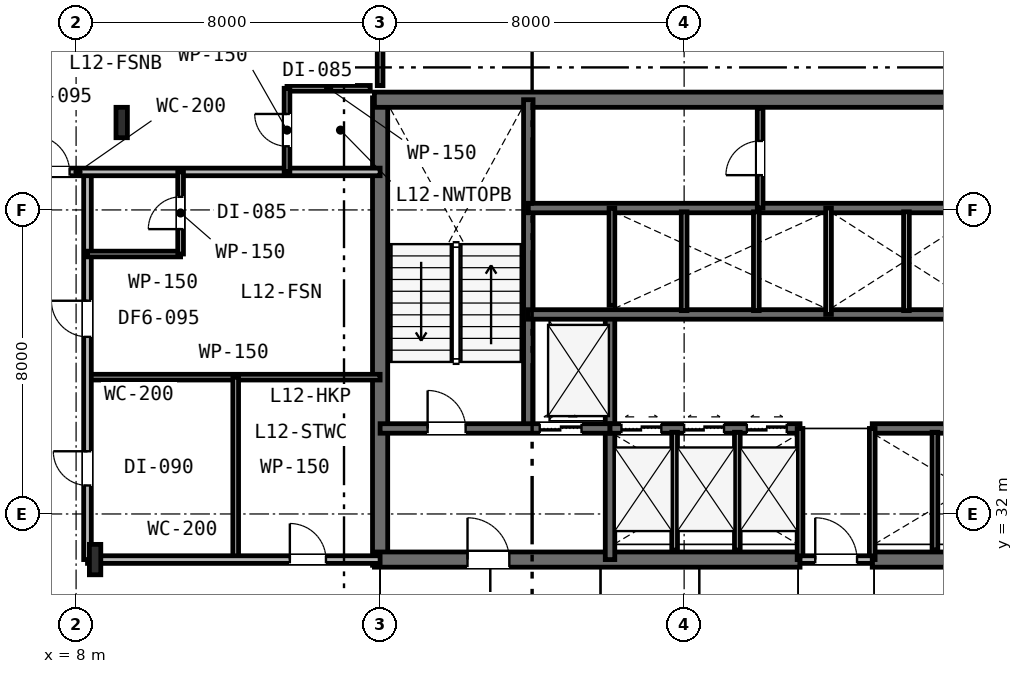
"""IFC4 building model, lengths in metres.
Left out: names, types, materials, properties, quantities, classifications, styles, units other than length and angle.
Written with IfcOpenShell. Run it as: python <this file> out.ifc"""

import sys

from ifc_helpers import new_model, si_unit, direction, frame, frame_2d, origin, origin_2d, place, context, subcontext, project, spatial, rectangle, i_section, extrude, element, fill, save


model = new_model("IFC4")
c1 = context("Model", 3, precision=1e-05, world=origin(), true_north=direction((0.0, 1.0)))
c2 = subcontext(c1, "Body", "Model", "MODEL_VIEW")
j1 = project(units=[si_unit("LENGTHUNIT", "METRE"), si_unit("PLANEANGLEUNIT", "RADIAN")], contexts=[c1])
p1 = place(None, origin())
s1 = spatial("IfcSite", under=j1, at=p1, CompositionType="ELEMENT")
p2 = place(p1, origin())
s2 = spatial("IfcBuilding", under=s1, at=p2, CompositionType="ELEMENT")
p3 = place(p2, frame((0.0, 0.0, 51.0)))
s3 = spatial("IfcBuildingStorey", under=s2, at=p3, CompositionType="ELEMENT", Elevation=51.0)
p4 = place(p3, frame((16.0, 30.65, 0.0), z_axis=(0.0, 0.0, 1.0), x_axis=(0.0, 1.0, 0.0)))
e1 = element("IfcWall", 1, at=p4, inside=s3, PredefinedType="SHEAR", context=c2, shape_type="SweptSolid", body=[
    extrude(rectangle(XDim=12.3, YDim=0.4, at=frame_2d((6.15, 0.0))), origin(), (0.0, 0.0, 1.0), 3.6),
])
p5 = place(p3, frame((15.85, 42.9, 0.0), z_axis=(0.0, 0.0, 1.0), x_axis=(1.0, 0.0, 0.0)))
e2 = element("IfcWall", 2, at=p5, inside=s3, PredefinedType="SHEAR", context=c2, shape_type="SweptSolid", body=[
    extrude(rectangle(XDim=24.3, YDim=0.4, at=frame_2d((12.15, 0.0))), origin(), (0.0, 0.0, 1.0), 3.6),
])
p6 = place(p3, frame((15.85, 30.8, 0.0), z_axis=(0.0, 0.0, 1.0), x_axis=(1.0, 0.0, 0.0)))
e3 = element("IfcWall", 3, at=p6, inside=s3, PredefinedType="SHEAR", context=c2, shape_type="SweptSolid", body=[
    extrude(rectangle(XDim=11.2, YDim=0.4, at=frame_2d((5.6, 0.0))), origin(), (0.0, 0.0, 1.0), 3.6),
])
p7 = place(p6, frame((2.45, 0.0, 0.0)))
e4 = element("IfcOpeningElement", 4, at=p7, cuts=e3, PredefinedType="OPENING", context=c2, shape_type="SweptSolid", body=[
    extrude(rectangle(XDim=1.1, YDim=2.15, at=frame_2d((0.55, 1.075))), frame((0.0, 0.21, 0.0), z_axis=(0.0, -1.0, 0.0), x_axis=(1.0, 0.0, 0.0)), (0.0, 0.0, 1.0), 0.42),
])
p8 = place(p3, frame((28.95, 30.8, 0.0), z_axis=(0.0, 0.0, 1.0), x_axis=(1.0, 0.0, 0.0)))
e5 = element("IfcWall", 5, at=p8, inside=s3, PredefinedType="SHEAR", context=c2, shape_type="SweptSolid", body=[
    extrude(rectangle(XDim=11.2, YDim=0.4, at=frame_2d((5.6, 0.0))), origin(), (0.0, 0.0, 1.0), 3.6),
])
p9 = place(p8, frame((7.65, 0.0, 0.0)))
e6 = element("IfcOpeningElement", 6, at=p9, cuts=e5, PredefinedType="OPENING", context=c2, shape_type="SweptSolid", body=[
    extrude(rectangle(XDim=1.1, YDim=2.15, at=frame_2d((0.55, 1.075))), frame((0.0, 0.21, 0.0), z_axis=(0.0, -1.0, 0.0), x_axis=(1.0, 0.0, 0.0)), (0.0, 0.0, 1.0), 0.42),
])
p10 = place(p3, frame((19.9, 34.25, 0.0), z_axis=(0.0, 0.0, 1.0), x_axis=(0.0, 1.0, 0.0)))
e7 = element("IfcWall", 7, at=p10, inside=s3, PredefinedType="SHEAR", context=c2, shape_type="SweptSolid", body=[
    extrude(rectangle(XDim=8.65, YDim=0.25, at=frame_2d((4.325, 0.0))), origin(), (0.0, 0.0, 1.0), 3.6),
])
p11 = place(p3, frame((22.05, 30.8, 0.0), z_axis=(0.0, 0.0, 1.0), x_axis=(0.0, 1.0, 0.0)))
e8 = element("IfcWall", 8, at=p11, inside=s3, PredefinedType="SHEAR", context=c2, shape_type="SweptSolid", body=[
    extrude(rectangle(XDim=6.45, YDim=0.25, at=frame_2d((3.225, 0.0))), origin(), (0.0, 0.0, 1.0), 3.6),
])
p12 = place(p3, frame((16.0, 34.25, 0.0), z_axis=(0.0, 0.0, 1.0), x_axis=(1.0, 0.0, 0.0)))
e9 = element("IfcWall", 9, at=p12, inside=s3, PredefinedType="SHEAR", context=c2, shape_type="SweptSolid", body=[
    extrude(rectangle(XDim=6.05, YDim=0.25, at=frame_2d((3.025, 0.0))), origin(), (0.0, 0.0, 1.0), 3.6),
])
p13 = place(p12, frame((1.25, 0.0, 0.0)))
e10 = element("IfcOpeningElement", 10, at=p13, cuts=e9, PredefinedType="OPENING", context=c2, shape_type="SweptSolid", body=[
    extrude(rectangle(XDim=1.0, YDim=2.15, at=frame_2d((0.5, 1.075))), frame((0.0, 0.135, 0.0), z_axis=(0.0, -1.0, 0.0), x_axis=(1.0, 0.0, 0.0)), (0.0, 0.0, 1.0), 0.27),
])
p14 = place(p12, frame((4.2, 0.0, 0.0)))
e11 = element("IfcOpeningElement", 11, at=p14, cuts=e9, PredefinedType="OPENING", context=c2, shape_type="SweptSolid", body=[
    extrude(rectangle(XDim=1.1, YDim=2.15, at=frame_2d((0.55, 1.075))), frame((0.0, 0.135, 0.0), z_axis=(0.0, -1.0, 0.0), x_axis=(1.0, 0.0, 0.0)), (0.0, 0.0, 1.0), 0.27),
])
p15 = place(p3, frame((22.05, 34.25, 0.0), z_axis=(0.0, 0.0, 1.0), x_axis=(1.0, 0.0, 0.0)))
e12 = element("IfcWall", 12, at=p15, inside=s3, PredefinedType="SHEAR", context=c2, shape_type="SweptSolid", body=[
    extrude(rectangle(XDim=5.0, YDim=0.25, at=frame_2d((2.5, 0.0))), origin(), (0.0, 0.0, 1.0), 3.6),
])
p16 = place(p15, frame((0.3, 0.0, 0.0)))
e13 = element("IfcOpeningElement", 13, at=p16, cuts=e12, PredefinedType="OPENING", context=c2, shape_type="SweptSolid", body=[
    extrude(rectangle(XDim=1.05, YDim=2.15, at=frame_2d((0.525, 1.075))), frame((0.0, 0.135, 0.0), z_axis=(0.0, -1.0, 0.0), x_axis=(1.0, 0.0, 0.0)), (0.0, 0.0, 1.0), 0.27),
])
p17 = place(p15, frame((1.95, 0.0, 0.0)))
e14 = element("IfcOpeningElement", 14, at=p17, cuts=e12, PredefinedType="OPENING", context=c2, shape_type="SweptSolid", body=[
    extrude(rectangle(XDim=1.05, YDim=2.15, at=frame_2d((0.525, 1.075))), frame((0.0, 0.135, 0.0), z_axis=(0.0, -1.0, 0.0), x_axis=(1.0, 0.0, 0.0)), (0.0, 0.0, 1.0), 0.27),
])
p18 = place(p15, frame((3.6, 0.0, 0.0)))
e15 = element("IfcOpeningElement", 15, at=p18, cuts=e12, PredefinedType="OPENING", context=c2, shape_type="SweptSolid", body=[
    extrude(rectangle(XDim=1.05, YDim=2.15, at=frame_2d((0.525, 1.075))), frame((0.0, 0.135, 0.0), z_axis=(0.0, -1.0, 0.0), x_axis=(1.0, 0.0, 0.0)), (0.0, 0.0, 1.0), 0.27),
])
p19 = place(p3, frame((28.95, 34.25, 0.0), z_axis=(0.0, 0.0, 1.0), x_axis=(1.0, 0.0, 0.0)))
e16 = element("IfcWall", 16, at=p19, inside=s3, PredefinedType="SHEAR", context=c2, shape_type="SweptSolid", body=[
    extrude(rectangle(XDim=5.0, YDim=0.25, at=frame_2d((2.5, 0.0))), origin(), (0.0, 0.0, 1.0), 3.6),
])
p20 = place(p3, frame((19.9, 37.25, 0.0), z_axis=(0.0, 0.0, 1.0), x_axis=(1.0, 0.0, 0.0)))
e17 = element("IfcWall", 17, at=p20, inside=s3, PredefinedType="SHEAR", context=c2, shape_type="SweptSolid", body=[
    extrude(rectangle(XDim=16.2, YDim=0.25, at=frame_2d((8.1, 0.0))), origin(), (0.0, 0.0, 1.0), 3.6),
])
p21 = place(p20, frame((12.55, 0.0, 0.0)))
e18 = element("IfcOpeningElement", 18, at=p21, cuts=e17, PredefinedType="OPENING", context=c2, shape_type="SweptSolid", body=[
    extrude(rectangle(XDim=0.9, YDim=2.15, at=frame_2d((0.45, 1.075))), frame((0.0, 0.135, 0.0), z_axis=(0.0, -1.0, 0.0), x_axis=(1.0, 0.0, 0.0)), (0.0, 0.0, 1.0), 0.27),
])
p22 = place(p3, frame((19.9, 40.05, 0.0), z_axis=(0.0, 0.0, 1.0), x_axis=(1.0, 0.0, 0.0)))
e19 = element("IfcWall", 19, at=p22, inside=s3, PredefinedType="SHEAR", context=c2, shape_type="SweptSolid", body=[
    extrude(rectangle(XDim=12.05, YDim=0.25, at=frame_2d((6.025, 0.0))), origin(), (0.0, 0.0, 1.0), 3.6),
])
for number, where, z_axis, x_axis in (
    (20, (8.5, 30.8, 0.0), (0.0, 0.0, 1.0), (1.0, 0.0, 0.0)),
    (21, (9.2, 42.3, 0.0), (0.0, 0.0, 1.0), (1.0, 0.0, 0.0)),
):
    element("IfcColumn", number, at=place(p3, frame(where, z_axis=z_axis, x_axis=x_axis)), inside=s3, PredefinedType="COLUMN", context=c2, shape_type="SweptSolid", body=[
        extrude(i_section(OverallWidth=0.3, OverallDepth=0.8, WebThickness=0.018, FlangeThickness=0.033, FilletRadius=0.03, at=origin_2d()), origin(), (0.0, 0.0, 1.0), 3.6),
    ])
for number, where, z_axis, x_axis in (
    (22, (27.05, 30.8, 0.0), (0.0, 0.0, 1.0), (0.0, 1.0, 0.0)),
    (23, (28.95, 30.8, 0.0), (0.0, 0.0, 1.0), (0.0, 1.0, 0.0)),
):
    element("IfcWall", number, at=place(p3, frame(where, z_axis=z_axis, x_axis=x_axis)), inside=s3, PredefinedType="PLUMBINGWALL", context=c2, shape_type="SweptSolid", body=[
        extrude(rectangle(XDim=3.45, YDim=0.15, at=frame_2d((1.725, 0.0))), origin(), (0.0, 0.0, 1.0), 3.33),
    ])
p23 = place(p3, frame((27.05, 30.8, 0.0), z_axis=(0.0, 0.0, 1.0), x_axis=(1.0, 0.0, 0.0)))
e24 = element("IfcWall", 24, at=p23, inside=s3, PredefinedType="PARTITIONING", context=c2, shape_type="SweptSolid", body=[
    extrude(rectangle(XDim=1.9, YDim=0.2, at=frame_2d((0.95, 0.0))), origin(), (0.0, 0.0, 1.0), 3.33),
])
p24 = place(p23, frame((0.4, 0.0, 0.0)))
e25 = element("IfcOpeningElement", 25, at=p24, cuts=e24, PredefinedType="OPENING", context=c2, shape_type="SweptSolid", body=[
    extrude(rectangle(XDim=1.1, YDim=2.15, at=frame_2d((0.55, 1.075))), frame((0.0, 0.11, 0.0), z_axis=(0.0, -1.0, 0.0), x_axis=(1.0, 0.0, 0.0)), (0.0, 0.0, 1.0), 0.22),
])
for number, where, z_axis, x_axis in (
    (26, (23.75, 31.05, 0.0), (0.0, 0.0, 1.0), (0.0, 1.0, 0.0)),
    (27, (25.4, 31.05, 0.0), (0.0, 0.0, 1.0), (0.0, 1.0, 0.0)),
    (28, (30.6, 31.05, 0.0), (0.0, 0.0, 1.0), (0.0, 1.0, 0.0)),
):
    element("IfcWall", number, at=place(p3, frame(where, z_axis=z_axis, x_axis=x_axis)), inside=s3, PredefinedType="PLUMBINGWALL", context=c2, shape_type="SweptSolid", body=[
        extrude(rectangle(XDim=3.1, YDim=0.15, at=frame_2d((1.55, 0.0))), origin(), (0.0, 0.0, 1.0), 3.33),
    ])
p25 = place(p3, frame((22.1, 37.49, 0.0), z_axis=(0.0, 0.0, 1.0), x_axis=(0.0, 1.0, 0.0)))
e29 = element("IfcWall", 29, at=p25, inside=s3, PredefinedType="PLUMBINGWALL", context=c2, shape_type="SweptSolid", body=[
    extrude(rectangle(XDim=2.56, YDim=0.15, at=frame_2d((1.28, 0.0))), origin(), (0.0, 0.0, 1.0), 3.33),
])
p26 = place(p3, frame((27.8, 37.25, 0.0), z_axis=(0.0, 0.0, 1.0), x_axis=(0.0, 1.0, 0.0)))
e30 = element("IfcWall", 30, at=p26, inside=s3, PredefinedType="PLUMBINGWALL", context=c2, shape_type="SweptSolid", body=[
    extrude(rectangle(XDim=2.8, YDim=0.15, at=frame_2d((1.4, 0.0))), origin(), (0.0, 0.0, 1.0), 3.33),
])
for number, where, z_axis, x_axis in (
    (31, (24.0, 37.35, 0.0), (0.0, 0.0, 1.0), (0.0, 1.0, 0.0)),
    (32, (25.9, 37.35, 0.0), (0.0, 0.0, 1.0), (0.0, 1.0, 0.0)),
    (33, (29.85, 37.35, 0.0), (0.0, 0.0, 1.0), (0.0, 1.0, 0.0)),
):
    element("IfcWall", number, at=place(p3, frame(where, z_axis=z_axis, x_axis=x_axis)), inside=s3, PredefinedType="PLUMBINGWALL", context=c2, shape_type="SweptSolid", body=[
        extrude(rectangle(XDim=2.6, YDim=0.15, at=frame_2d((1.3, 0.0))), origin(), (0.0, 0.0, 1.0), 3.33),
    ])
p27 = place(p3, frame((26.0, 40.05, 0.0), z_axis=(0.0, 0.0, 1.0), x_axis=(0.0, 1.0, 0.0)))
e34 = element("IfcWall", 34, at=p27, inside=s3, PredefinedType="PARTITIONING", context=c2, shape_type="SweptSolid", body=[
    extrude(rectangle(XDim=2.63, YDim=0.15, at=frame_2d((1.315, 0.0))), origin(), (0.0, 0.0, 1.0), 3.33),
])
p28 = place(p27, frame((0.865, 0.0, 0.0)))
e35 = element("IfcOpeningElement", 35, at=p28, cuts=e34, PredefinedType="OPENING", context=c2, shape_type="SweptSolid", body=[
    extrude(rectangle(XDim=0.9, YDim=2.15, at=frame_2d((0.45, 1.075))), frame((0.0, 0.085, 0.0), z_axis=(0.0, -1.0, 0.0), x_axis=(1.0, 0.0, 0.0)), (0.0, 0.0, 1.0), 0.17),
])
p29 = place(p3, frame((8.3, 35.6, 0.0), z_axis=(0.0, 0.0, 1.0), x_axis=(1.0, 0.0, 0.0)))
e36 = element("IfcWall", 36, at=p29, inside=s3, PredefinedType="PARTITIONING", context=c2, shape_type="SweptSolid", body=[
    extrude(rectangle(XDim=7.7, YDim=0.15, at=frame_2d((3.85, 0.0))), origin(), (0.0, 0.0, 1.0), 2.82),
])
p30 = place(p3, frame((12.2, 30.8, 0.0), z_axis=(0.0, 0.0, 1.0), x_axis=(0.0, 1.0, 0.0)))
e37 = element("IfcWall", 37, at=p30, inside=s3, PredefinedType="PARTITIONING", context=c2, shape_type="SweptSolid", body=[
    extrude(rectangle(XDim=4.8, YDim=0.15, at=frame_2d((2.4, 0.0))), origin(), (0.0, 0.0, 1.0), 2.82),
])
p31 = place(p3, frame((8.3, 30.8, 0.0), z_axis=(0.0, 0.0, 1.0), x_axis=(1.0, 0.0, 0.0)))
e38 = element("IfcWall", 38, at=p31, inside=s3, PredefinedType="PARTITIONING", context=c2, shape_type="SweptSolid", body=[
    extrude(rectangle(XDim=7.7, YDim=0.2, at=frame_2d((3.85, 0.0))), origin(), (0.0, 0.0, 1.0), 2.82),
])
p32 = place(p31, frame((5.325, 0.0, 0.0)))
e39 = element("IfcOpeningElement", 39, at=p32, cuts=e38, PredefinedType="OPENING", context=c2, shape_type="SweptSolid", body=[
    extrude(rectangle(XDim=0.95, YDim=2.15, at=frame_2d((0.475, 1.075))), frame((0.0, 0.11, 0.0), z_axis=(0.0, -1.0, 0.0), x_axis=(1.0, 0.0, 0.0)), (0.0, 0.0, 1.0), 0.22),
])
p33 = place(p3, frame((8.3, 30.8, 0.0), z_axis=(0.0, 0.0, 1.0), x_axis=(0.0, 1.0, 0.0)))
e40 = element("IfcWall", 40, at=p33, inside=s3, PredefinedType="PARTITIONING", context=c2, shape_type="SweptSolid", body=[
    extrude(rectangle(XDim=10.2, YDim=0.2, at=frame_2d((5.1, 0.0))), origin(), (0.0, 0.0, 1.0), 2.82),
])
p34 = place(p33, frame((1.95, 0.0, 0.0)))
e41 = element("IfcOpeningElement", 41, at=p34, cuts=e40, PredefinedType="OPENING", context=c2, shape_type="SweptSolid", body=[
    extrude(rectangle(XDim=0.9, YDim=2.15, at=frame_2d((0.45, 1.075))), frame((0.0, 0.11, 0.0), z_axis=(0.0, -1.0, 0.0), x_axis=(1.0, 0.0, 0.0)), (0.0, 0.0, 1.0), 0.22),
])
p35 = place(p33, frame((5.861, 0.0, 0.0)))
e42 = element("IfcOpeningElement", 42, at=p35, cuts=e40, PredefinedType="OPENING", context=c2, shape_type="SweptSolid", body=[
    extrude(rectangle(XDim=0.95, YDim=2.15, at=frame_2d((0.475, 1.075))), frame((0.0, 0.11, 0.0), z_axis=(0.0, -1.0, 0.0), x_axis=(1.0, 0.0, 0.0)), (0.0, 0.0, 1.0), 0.22),
])
p36 = place(p3, frame((0.1, 41.0, 0.0), z_axis=(0.0, 0.0, 1.0), x_axis=(1.0, 0.0, 0.0)))
e43 = element("IfcWall", 43, at=p36, inside=s3, PredefinedType="PARTITIONING", context=c2, shape_type="SweptSolid", body=[
    extrude(rectangle(XDim=15.9, YDim=0.2, at=frame_2d((7.95, 0.0))), origin(), (0.0, 0.0, 1.0), 2.82),
])
p37 = place(p36, frame((6.779, 0.0, 0.0)))
e44 = element("IfcOpeningElement", 44, at=p37, cuts=e43, PredefinedType="OPENING", context=c2, shape_type="SweptSolid", body=[
    extrude(rectangle(XDim=0.95, YDim=2.15, at=frame_2d((0.475, 1.075))), frame((0.0, 0.11, 0.0), z_axis=(0.0, -1.0, 0.0), x_axis=(1.0, 0.0, 0.0)), (0.0, 0.0, 1.0), 0.22),
])
p38 = place(p3, frame((13.55, 43.2, 0.0), z_axis=(0.0, 0.0, 1.0), x_axis=(1.0, 0.0, 0.0)))
e45 = element("IfcWall", 45, at=p38, inside=s3, PredefinedType="PARTITIONING", context=c2, shape_type="SweptSolid", body=[
    extrude(rectangle(XDim=2.19, YDim=0.15, at=frame_2d((1.095, 0.0))), origin(), (0.0, 0.0, 1.0), 3.33),
])
p39 = place(p3, frame((13.55, 41.0, 0.0), z_axis=(0.0, 0.0, 1.0), x_axis=(0.0, 1.0, 0.0)))
e46 = element("IfcWall", 46, at=p39, inside=s3, PredefinedType="PARTITIONING", context=c2, shape_type="SweptSolid", body=[
    extrude(rectangle(XDim=2.2, YDim=0.15, at=frame_2d((1.1, 0.0))), origin(), (0.0, 0.0, 1.0), 3.33),
])
p40 = place(p39, frame((0.675, 0.0, 0.0)))
e47 = element("IfcOpeningElement", 47, at=p40, cuts=e46, PredefinedType="OPENING", context=c2, shape_type="SweptSolid", body=[
    extrude(rectangle(XDim=0.85, YDim=2.15, at=frame_2d((0.425, 1.075))), frame((0.0, 0.085, 0.0), z_axis=(0.0, -1.0, 0.0), x_axis=(1.0, 0.0, 0.0)), (0.0, 0.0, 1.0), 0.17),
])
p41 = place(p3, frame((8.3, 38.84, 0.0), z_axis=(0.0, 0.0, 1.0), x_axis=(1.0, 0.0, 0.0)))
e48 = element("IfcWall", 48, at=p41, inside=s3, PredefinedType="PARTITIONING", context=c2, shape_type="SweptSolid", body=[
    extrude(rectangle(XDim=2.45, YDim=0.15, at=frame_2d((1.225, 0.0))), origin(), (0.0, 0.0, 1.0), 2.82),
])
p42 = place(p3, frame((10.75, 38.84, 0.0), z_axis=(0.0, 0.0, 1.0), x_axis=(0.0, 1.0, 0.0)))
e49 = element("IfcWall", 49, at=p42, inside=s3, PredefinedType="PARTITIONING", context=c2, shape_type="SweptSolid", body=[
    extrude(rectangle(XDim=2.16, YDim=0.15, at=frame_2d((1.08, 0.0))), origin(), (0.0, 0.0, 1.0), 3.33),
])
p43 = place(p42, frame((0.655, 0.0, 0.0)))
e50 = element("IfcOpeningElement", 50, at=p43, cuts=e49, PredefinedType="OPENING", context=c2, shape_type="SweptSolid", body=[
    extrude(rectangle(XDim=0.85, YDim=2.15, at=frame_2d((0.425, 1.075))), frame((0.0, 0.085, 0.0), z_axis=(0.0, -1.0, 0.0), x_axis=(1.0, 0.0, 0.0)), (0.0, 0.0, 1.0), 0.17),
])
p44 = place(p3, frame((16.0, 43.27, 0.0), z_axis=(0.0, 0.0, 1.0), x_axis=(0.0, 1.0, 0.0)))
e51 = element("IfcWall", 51, at=p44, inside=s3, PredefinedType="PARTITIONING", context=c2, shape_type="SweptSolid", body=[
    extrude(rectangle(XDim=4.63, YDim=0.15, at=frame_2d((2.315, 0.0))), origin(), (0.0, 0.0, 1.0), 2.93),
])
p45 = place(p24, origin())
e52 = element("IfcDoor", 52, at=p45, inside=s3, OperationType="SINGLE_SWING_LEFT", PredefinedType="DOOR", context=c2, shape_type="SweptSolid", body=[
    extrude(rectangle(XDim=1.1, YDim=2.15, at=frame_2d((0.55, 1.075))), frame((0.0, 0.025, 0.0), z_axis=(0.0, -1.0, 0.0), x_axis=(1.0, 0.0, 0.0)), (0.0, 0.0, 1.0), 0.05),
])
fill(e25, e52)
p46 = place(p13, origin())
e53 = element("IfcDoor", 53, at=p46, inside=s3, OperationType="SINGLE_SWING_LEFT", PredefinedType="DOOR", context=c2, shape_type="SweptSolid", body=[
    extrude(rectangle(XDim=1.0, YDim=2.15, at=frame_2d((0.5, 1.075))), frame((0.0, 0.025, 0.0), z_axis=(0.0, -1.0, 0.0), x_axis=(1.0, 0.0, 0.0)), (0.0, 0.0, 1.0), 0.05),
])
fill(e10, e53)
p47 = place(p7, origin())
e54 = element("IfcDoor", 54, at=p47, inside=s3, OperationType="SINGLE_SWING_LEFT", PredefinedType="DOOR", context=c2, shape_type="SweptSolid", body=[
    extrude(rectangle(XDim=1.1, YDim=2.15, at=frame_2d((0.55, 1.075))), frame((0.0, 0.025, 0.0), z_axis=(0.0, -1.0, 0.0), x_axis=(1.0, 0.0, 0.0)), (0.0, 0.0, 1.0), 0.05),
])
fill(e4, e54)
p48 = place(p28, origin())
e55 = element("IfcDoor", 55, at=p48, inside=s3, OperationType="SINGLE_SWING_LEFT", PredefinedType="DOOR", context=c2, shape_type="SweptSolid", body=[
    extrude(rectangle(XDim=0.9, YDim=2.15, at=frame_2d((0.45, 1.075))), frame((0.0, 0.025, 0.0), z_axis=(0.0, -1.0, 0.0), x_axis=(1.0, 0.0, 0.0)), (0.0, 0.0, 1.0), 0.05),
])
fill(e35, e55)
p49 = place(p32, origin())
e56 = element("IfcDoor", 56, at=p49, inside=s3, OperationType="SINGLE_SWING_LEFT", PredefinedType="DOOR", context=c2, shape_type="SweptSolid", body=[
    extrude(rectangle(XDim=0.95, YDim=2.15, at=frame_2d((0.475, 1.075))), frame((0.0, 0.025, 0.0), z_axis=(0.0, -1.0, 0.0), x_axis=(1.0, 0.0, 0.0)), (0.0, 0.0, 1.0), 0.05),
])
fill(e39, e56)
p50 = place(p34, origin())
e57 = element("IfcDoor", 57, at=p50, inside=s3, OperationType="SINGLE_SWING_RIGHT", PredefinedType="DOOR", context=c2, shape_type="SweptSolid", body=[
    extrude(rectangle(XDim=0.9, YDim=2.15, at=frame_2d((0.45, 1.075))), frame((0.0, 0.025, 0.0), z_axis=(0.0, -1.0, 0.0), x_axis=(1.0, 0.0, 0.0)), (0.0, 0.0, 1.0), 0.05),
])
fill(e41, e57)
p51 = place(p37, origin())
e58 = element("IfcDoor", 58, at=p51, inside=s3, OperationType="SINGLE_SWING_LEFT", PredefinedType="DOOR", context=c2, shape_type="SweptSolid", body=[
    extrude(rectangle(XDim=0.95, YDim=2.15, at=frame_2d((0.475, 1.075))), frame((0.0, 0.025, 0.0), z_axis=(0.0, -1.0, 0.0), x_axis=(1.0, 0.0, 0.0)), (0.0, 0.0, 1.0), 0.05),
])
fill(e44, e58)
p52 = place(p40, origin())
e59 = element("IfcDoor", 59, at=p52, inside=s3, OperationType="SINGLE_SWING_RIGHT", PredefinedType="DOOR", context=c2, shape_type="SweptSolid", body=[
    extrude(rectangle(XDim=0.85, YDim=2.15, at=frame_2d((0.425, 1.075))), frame((0.0, 0.025, 0.0), z_axis=(0.0, -1.0, 0.0), x_axis=(1.0, 0.0, 0.0)), (0.0, 0.0, 1.0), 0.05),
])
fill(e47, e59)
p53 = place(p35, origin())
e60 = element("IfcDoor", 60, at=p53, inside=s3, OperationType="SINGLE_SWING_RIGHT", PredefinedType="DOOR", context=c2, shape_type="SweptSolid", body=[
    extrude(rectangle(XDim=0.95, YDim=2.15, at=frame_2d((0.475, 1.075))), frame((0.0, 0.025, 0.0), z_axis=(0.0, -1.0, 0.0), x_axis=(1.0, 0.0, 0.0)), (0.0, 0.0, 1.0), 0.05),
])
fill(e42, e60)
p54 = place(p43, origin())
e61 = element("IfcDoor", 61, at=p54, inside=s3, OperationType="SINGLE_SWING_LEFT", PredefinedType="DOOR", context=c2, shape_type="SweptSolid", body=[
    extrude(rectangle(XDim=0.85, YDim=2.15, at=frame_2d((0.425, 1.075))), frame((0.0, 0.025, 0.0), z_axis=(0.0, -1.0, 0.0), x_axis=(1.0, 0.0, 0.0)), (0.0, 0.0, 1.0), 0.05),
])
fill(e50, e61)
p55 = place(p14, origin())
e62 = element("IfcDoor", 62, at=p55, inside=s3, OperationType="DOUBLE_DOOR_SLIDING", PredefinedType="DOOR", context=c2, shape_type="SweptSolid", body=[
    extrude(rectangle(XDim=1.1, YDim=2.15, at=frame_2d((0.55, 1.075))), frame((0.0, 0.025, 0.0), z_axis=(0.0, -1.0, 0.0), x_axis=(1.0, 0.0, 0.0)), (0.0, 0.0, 1.0), 0.05),
])
fill(e11, e62)
p56 = place(p16, origin())
e63 = element("IfcDoor", 63, at=p56, inside=s3, OperationType="DOUBLE_DOOR_SLIDING", PredefinedType="DOOR", context=c2, shape_type="SweptSolid", body=[
    extrude(rectangle(XDim=1.05, YDim=2.15, at=frame_2d((0.525, 1.075))), frame((0.0, 0.025, 0.0), z_axis=(0.0, -1.0, 0.0), x_axis=(1.0, 0.0, 0.0)), (0.0, 0.0, 1.0), 0.05),
])
fill(e13, e63)
p57 = place(p17, origin())
e64 = element("IfcDoor", 64, at=p57, inside=s3, OperationType="DOUBLE_DOOR_SLIDING", PredefinedType="DOOR", context=c2, shape_type="SweptSolid", body=[
    extrude(rectangle(XDim=1.05, YDim=2.15, at=frame_2d((0.525, 1.075))), frame((0.0, 0.025, 0.0), z_axis=(0.0, -1.0, 0.0), x_axis=(1.0, 0.0, 0.0)), (0.0, 0.0, 1.0), 0.05),
])
fill(e14, e64)
p58 = place(p18, origin())
e65 = element("IfcDoor", 65, at=p58, inside=s3, OperationType="DOUBLE_DOOR_SLIDING", PredefinedType="DOOR", context=c2, shape_type="SweptSolid", body=[
    extrude(rectangle(XDim=1.05, YDim=2.15, at=frame_2d((0.525, 1.075))), frame((0.0, 0.025, 0.0), z_axis=(0.0, -1.0, 0.0), x_axis=(1.0, 0.0, 0.0)), (0.0, 0.0, 1.0), 0.05),
])
fill(e15, e65)
save(model, sys.argv[1])
